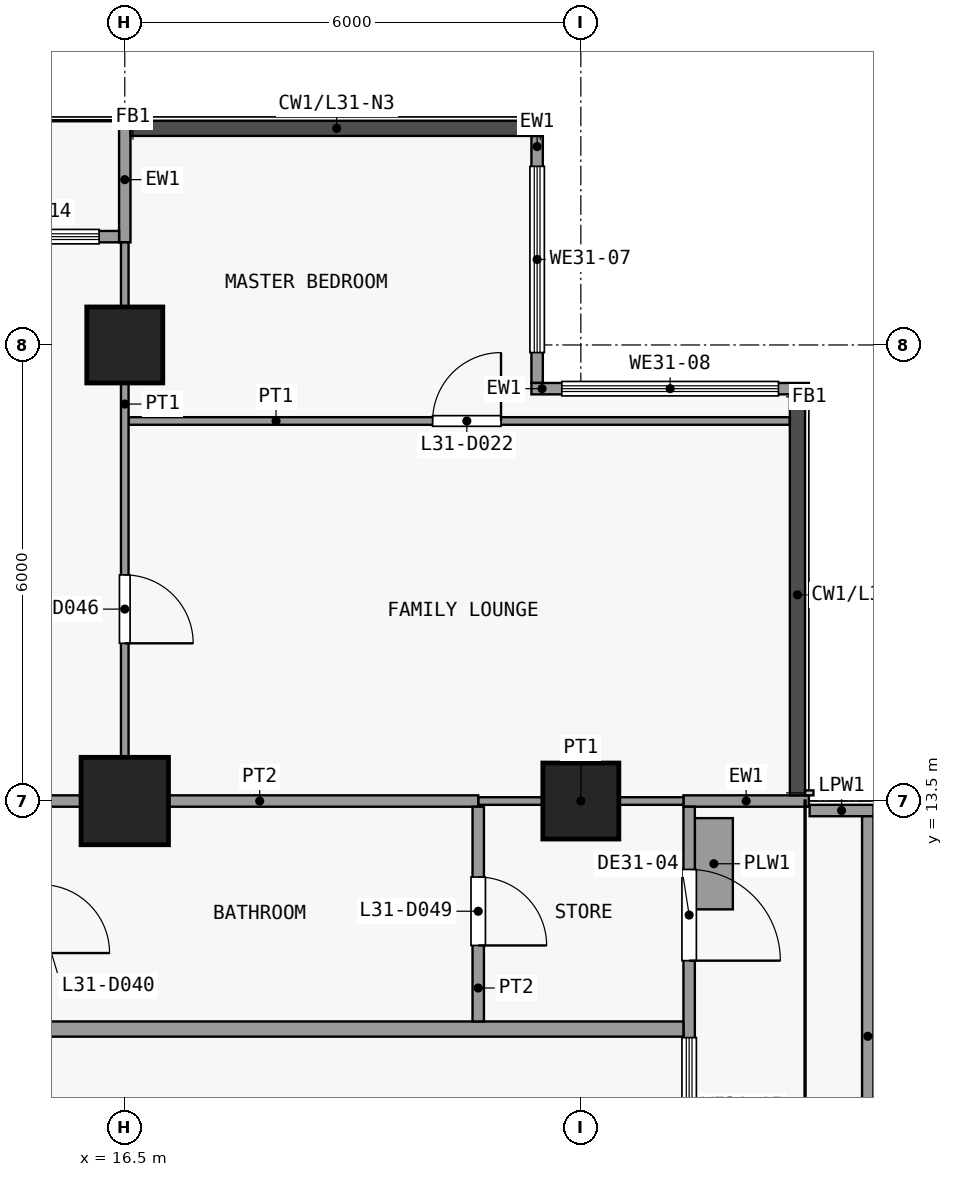
"""IFC4 building model, lengths in metres.
Left out: names, types, materials, properties, quantities, classifications, styles, units other than length and angle.
Written with IfcOpenShell. Run it as: python <this file> out.ifc"""

import sys

from ifc_helpers import new_model, si_unit, direction, frame, frame_2d, origin, origin_2d, place, context, subcontext, project, spatial, rectangle, extrude, element, fill, save


model = new_model("IFC4")
c1 = context("Model", 3, precision=1e-05, world=origin(), true_north=direction((0.0, 1.0)))
c2 = subcontext(c1, "Body", "Model", "MODEL_VIEW")
j1 = project(units=[si_unit("LENGTHUNIT", "METRE"), si_unit("PLANEANGLEUNIT", "RADIAN")], contexts=[c1])
p1 = place(None, origin())
s1 = spatial("IfcSite", under=j1, at=p1, CompositionType="ELEMENT")
p2 = place(p1, origin())
s2 = spatial("IfcBuilding", under=s1, at=p2, CompositionType="ELEMENT")
p3 = place(p2, frame((0.0, 0.0, 124.3)))
s3 = spatial("IfcBuildingStorey", under=s2, at=p3, CompositionType="ELEMENT", Elevation=124.3)
p4 = place(p3, frame((16.5, 13.5, 0.0), z_axis=(0.0, 0.0, 1.0), x_axis=(1.0, 0.0, 0.0)))
e1 = element("IfcColumn", 1, at=p4, inside=s3, PredefinedType="COLUMN", context=c2, shape_type="SweptSolid", body=[
    extrude(rectangle(XDim=1.15, YDim=1.15, at=origin_2d()), origin(), (0.0, 0.0, 1.0), 3.6),
])
for number, where, z_axis, x_axis in (
    (2, (16.5, 19.5, 0.0), (0.0, 0.0, 1.0), (1.0, 0.0, 0.0)),
    (3, (22.5, 13.5, 0.0), (0.0, 0.0, 1.0), (1.0, 0.0, 0.0)),
):
    element("IfcColumn", number, at=place(p3, frame(where, z_axis=z_axis, x_axis=x_axis)), inside=s3, PredefinedType="COLUMN", context=c2, shape_type="SweptSolid", body=[
        extrude(rectangle(XDim=1.0, YDim=1.0, at=origin_2d()), origin(), (0.0, 0.0, 1.0), 3.6),
    ])
p5 = place(p3, frame((21.925, 22.25, 0.0), z_axis=(0.0, 0.0, 1.0), x_axis=(0.0, -1.0, 0.0)))
e4 = element("IfcWall", 4, at=p5, inside=s3, PredefinedType="SOLIDWALL", context=c2, shape_type="SweptSolid", body=[
    extrude(rectangle(XDim=3.25, YDim=0.15, at=frame_2d((1.625, 0.0))), origin(), (0.0, 0.0, 1.0), 3.3),
])
p6 = place(p5, frame((0.4, 0.0, 0.9)))
e5 = element("IfcOpeningElement", 5, at=p6, cuts=e4, PredefinedType="OPENING", context=c2, shape_type="SweptSolid", body=[
    extrude(rectangle(XDim=2.45, YDim=2.4, at=frame_2d((1.225, 1.2))), frame((0.0, 0.085, 0.0), z_axis=(0.0, -1.0, 0.0), x_axis=(1.0, 0.0, 0.0)), (0.0, 0.0, 1.0), 0.17),
])
p7 = place(p3, frame((21.85, 18.925, 0.0), z_axis=(0.0, 0.0, 1.0), x_axis=(1.0, 0.0, 0.0)))
e6 = element("IfcWall", 6, at=p7, inside=s3, PredefinedType="SOLIDWALL", context=c2, shape_type="SweptSolid", body=[
    extrude(rectangle(XDim=3.65, YDim=0.15, at=frame_2d((1.825, 0.0))), origin(), (0.0, 0.0, 1.0), 3.3),
])
p8 = place(p7, frame((0.4, 0.0, 0.9)))
e7 = element("IfcOpeningElement", 7, at=p8, cuts=e6, PredefinedType="OPENING", context=c2, shape_type="SweptSolid", body=[
    extrude(rectangle(XDim=2.85, YDim=2.4, at=frame_2d((1.425, 1.2))), frame((0.0, 0.085, 0.0), z_axis=(0.0, -1.0, 0.0), x_axis=(1.0, 0.0, 0.0)), (0.0, 0.0, 1.0), 0.17),
])
p9 = place(p3, frame((16.5, 20.85, 0.0), z_axis=(0.0, 0.0, 1.0), x_axis=(0.0, 1.0, 0.0)))
e8 = element("IfcWall", 8, at=p9, inside=s3, PredefinedType="SOLIDWALL", context=c2, shape_type="SweptSolid", body=[
    extrude(rectangle(XDim=1.65, YDim=0.15, at=frame_2d((0.825, 0.0))), origin(), (0.0, 0.0, 1.0), 3.3),
])
p10 = place(p3, frame((10.5, 20.925, 0.0), z_axis=(0.0, 0.0, 1.0), x_axis=(1.0, 0.0, 0.0)))
e9 = element("IfcWall", 9, at=p10, inside=s3, PredefinedType="SOLIDWALL", context=c2, shape_type="SweptSolid", body=[
    extrude(rectangle(XDim=5.925, YDim=0.15, at=frame_2d((2.962, 0.0))), origin(), (0.0, 0.0, 1.0), 3.3),
])
p11 = place(p10, frame((2.4, 0.0, 0.0)))
e10 = element("IfcOpeningElement", 10, at=p11, cuts=e9, PredefinedType="OPENING", context=c2, shape_type="SweptSolid", body=[
    extrude(rectangle(XDim=1.2, YDim=2.4, at=frame_2d((0.6, 1.2))), frame((0.0, 0.085, 0.0), z_axis=(0.0, -1.0, 0.0), x_axis=(1.0, 0.0, 0.0)), (0.0, 0.0, 1.0), 0.17),
])
p12 = place(p10, frame((0.3, 0.0, 0.9)))
e11 = element("IfcOpeningElement", 11, at=p12, cuts=e9, PredefinedType="OPENING", context=c2, shape_type="SweptSolid", body=[
    extrude(rectangle(XDim=1.8, YDim=2.1, at=frame_2d((0.9, 1.05))), frame((0.0, 0.085, 0.0), z_axis=(0.0, -1.0, 0.0), x_axis=(1.0, 0.0, 0.0)), (0.0, 0.0, 1.0), 0.17),
])
p13 = place(p10, frame((3.863, 0.0, 0.9)))
e12 = element("IfcOpeningElement", 12, at=p13, cuts=e9, PredefinedType="OPENING", context=c2, shape_type="SweptSolid", body=[
    extrude(rectangle(XDim=1.8, YDim=2.1, at=frame_2d((0.9, 1.05))), frame((0.0, 0.085, 0.0), z_axis=(0.0, -1.0, 0.0), x_axis=(1.0, 0.0, 0.0)), (0.0, 0.0, 1.0), 0.17),
])
p14 = place(p3, frame((23.85, 13.5, 0.0), z_axis=(0.0, 0.0, 1.0), x_axis=(1.0, 0.0, 0.0)))
e13 = element("IfcWall", 13, at=p14, inside=s3, PredefinedType="SOLIDWALL", context=c2, shape_type="SweptSolid", body=[
    extrude(rectangle(XDim=1.65, YDim=0.15, at=frame_2d((0.825, 0.0))), origin(), (0.0, 0.0, 1.0), 3.3),
])
p15 = place(p3, frame((23.925, 13.425, 0.0), z_axis=(0.0, 0.0, 1.0), x_axis=(0.0, -1.0, 0.0)))
e14 = element("IfcWall", 14, at=p15, inside=s3, PredefinedType="SOLIDWALL", context=c2, shape_type="SweptSolid", body=[
    extrude(rectangle(XDim=5.85, YDim=0.15, at=frame_2d((2.925, 0.0))), origin(), (0.0, 0.0, 1.0), 3.3),
])
p16 = place(p15, frame((0.825, 0.0, 0.0)))
e15 = element("IfcOpeningElement", 15, at=p16, cuts=e14, PredefinedType="OPENING", context=c2, shape_type="SweptSolid", body=[
    extrude(rectangle(XDim=1.2, YDim=2.4, at=frame_2d((0.6, 1.2))), frame((0.0, 0.085, 0.0), z_axis=(0.0, -1.0, 0.0), x_axis=(1.0, 0.0, 0.0)), (0.0, 0.0, 1.0), 0.17),
])
p17 = place(p15, frame((3.038, 0.0, 0.9)))
e16 = element("IfcOpeningElement", 16, at=p17, cuts=e14, PredefinedType="OPENING", context=c2, shape_type="SweptSolid", body=[
    extrude(rectangle(XDim=1.8, YDim=2.1, at=frame_2d((0.9, 1.05))), frame((0.0, 0.085, 0.0), z_axis=(0.0, -1.0, 0.0), x_axis=(1.0, 0.0, 0.0)), (0.0, 0.0, 1.0), 0.17),
])
p18 = place(p3, frame((24.25, 12.075, 0.0), z_axis=(0.0, 0.0, 1.0), x_axis=(0.0, 1.0, 0.0)))
e17 = element("IfcWall", 17, at=p18, inside=s3, PredefinedType="USERDEFINED", context=c2, shape_type="SweptSolid", body=[
    extrude(rectangle(XDim=1.2, YDim=0.5, at=frame_2d((0.6, 0.0))), origin(), (0.0, 0.0, 1.0), 0.9),
])
p19 = place(p3, frame((25.51, 13.375, 0.0), z_axis=(0.0, 0.0, 1.0), x_axis=(1.0, 0.0, 0.0)))
e18 = element("IfcWall", 18, at=p19, inside=s3, PredefinedType="PARAPET", context=c2, shape_type="SweptSolid", body=[
    extrude(rectangle(XDim=0.84, YDim=0.15, at=frame_2d((0.42, 0.0))), origin(), (0.0, 0.0, 1.0), 1.15),
])
p20 = place(p3, frame((26.275, 13.3, 0.0), z_axis=(0.0, 0.0, 1.0), x_axis=(0.0, -1.0, 0.0)))
e19 = element("IfcWall", 19, at=p20, inside=s3, PredefinedType="PARAPET", context=c2, shape_type="SweptSolid", body=[
    extrude(rectangle(XDim=5.79, YDim=0.15, at=frame_2d((2.895, 0.0))), origin(), (0.0, 0.0, 1.0), 1.15),
])
p21 = place(p3, frame((-25.35, 10.5, 0.0), z_axis=(0.0, 0.0, 1.0), x_axis=(1.0, 0.0, 0.0)))
e20 = element("IfcWall", 20, at=p21, inside=s3, PredefinedType="PARTITIONING", context=c2, shape_type="SweptSolid", body=[
    extrude(rectangle(XDim=49.2, YDim=0.2, at=frame_2d((24.6, 0.0))), origin(), (0.0, 0.0, 1.0), 3.3),
])
p22 = place(p21, frame((4.55, 0.0, 0.0)))
e21 = element("IfcOpeningElement", 21, at=p22, cuts=e20, PredefinedType="OPENING", context=c2, shape_type="SweptSolid", body=[
    extrude(rectangle(XDim=1.0, YDim=2.1, at=frame_2d((0.5, 1.05))), frame((0.0, 0.11, 0.0), z_axis=(0.0, -1.0, 0.0), x_axis=(1.0, 0.0, 0.0)), (0.0, 0.0, 1.0), 0.22),
])
p23 = place(p21, frame((19.05, 0.0, 0.0)))
e22 = element("IfcOpeningElement", 22, at=p23, cuts=e20, PredefinedType="OPENING", context=c2, shape_type="SweptSolid", body=[
    extrude(rectangle(XDim=1.0, YDim=2.1, at=frame_2d((0.5, 1.05))), frame((0.0, 0.11, 0.0), z_axis=(0.0, -1.0, 0.0), x_axis=(1.0, 0.0, 0.0)), (0.0, 0.0, 1.0), 0.22),
])
p24 = place(p21, frame((39.05, 0.0, 0.0)))
e23 = element("IfcOpeningElement", 23, at=p24, cuts=e20, PredefinedType="OPENING", context=c2, shape_type="SweptSolid", body=[
    extrude(rectangle(XDim=1.0, YDim=2.1, at=frame_2d((0.5, 1.05))), frame((0.0, 0.11, 0.0), z_axis=(0.0, -1.0, 0.0), x_axis=(1.0, 0.0, 0.0)), (0.0, 0.0, 1.0), 0.22),
])
p25 = place(p3, frame((21.15, 13.5, 0.0), z_axis=(0.0, 0.0, 1.0), x_axis=(1.0, 0.0, 0.0)))
e24 = element("IfcWall", 24, at=p25, inside=s3, PredefinedType="PARTITIONING", context=c2, shape_type="SweptSolid", body=[
    extrude(rectangle(XDim=2.7, YDim=0.1, at=frame_2d((1.35, 0.0))), origin(), (0.0, 0.0, 1.0), 3.3),
])
p26 = place(p3, frame((15.4, 13.5, 0.0), z_axis=(0.0, 0.0, 1.0), x_axis=(1.0, 0.0, 0.0)))
e25 = element("IfcWall", 25, at=p26, inside=s3, PredefinedType="PARTITIONING", context=c2, shape_type="SweptSolid", body=[
    extrude(rectangle(XDim=5.75, YDim=0.15, at=frame_2d((2.875, 0.0))), origin(), (0.0, 0.0, 1.0), 3.3),
])
p27 = place(p3, frame((16.55, 18.5, 0.0), z_axis=(0.0, 0.0, 1.0), x_axis=(1.0, 0.0, 0.0)))
e26 = element("IfcWall", 26, at=p27, inside=s3, PredefinedType="PARTITIONING", context=c2, shape_type="SweptSolid", body=[
    extrude(rectangle(XDim=8.7, YDim=0.1, at=frame_2d((4.35, 0.0))), origin(), (0.0, 0.0, 1.0), 3.3),
])
p28 = place(p27, frame((4.0, 0.0, 0.0)))
e27 = element("IfcOpeningElement", 27, at=p28, cuts=e26, PredefinedType="OPENING", context=c2, shape_type="SweptSolid", body=[
    extrude(rectangle(XDim=0.9, YDim=2.1, at=frame_2d((0.45, 1.05))), frame((0.0, 0.06, 0.0), z_axis=(0.0, -1.0, 0.0), x_axis=(1.0, 0.0, 0.0)), (0.0, 0.0, 1.0), 0.12),
])
p29 = place(p3, frame((16.5, 13.575, 0.0), z_axis=(0.0, 0.0, 1.0), x_axis=(0.0, 1.0, 0.0)))
e28 = element("IfcWall", 28, at=p29, inside=s3, PredefinedType="PARTITIONING", context=c2, shape_type="SweptSolid", body=[
    extrude(rectangle(XDim=7.275, YDim=0.1, at=frame_2d((3.638, 0.0))), origin(), (0.0, 0.0, 1.0), 3.3),
])
p30 = place(p29, frame((2.0, 0.0, 0.0)))
e29 = element("IfcOpeningElement", 29, at=p30, cuts=e28, PredefinedType="OPENING", context=c2, shape_type="SweptSolid", body=[
    extrude(rectangle(XDim=0.9, YDim=2.1, at=frame_2d((0.45, 1.05))), frame((0.0, 0.06, 0.0), z_axis=(0.0, -1.0, 0.0), x_axis=(1.0, 0.0, 0.0)), (0.0, 0.0, 1.0), 0.12),
])
p31 = place(p3, frame((21.15, 10.6, 0.0), z_axis=(0.0, 0.0, 1.0), x_axis=(0.0, 1.0, 0.0)))
e30 = element("IfcWall", 30, at=p31, inside=s3, PredefinedType="PARTITIONING", context=c2, shape_type="SweptSolid", body=[
    extrude(rectangle(XDim=2.825, YDim=0.15, at=frame_2d((1.413, 0.0))), origin(), (0.0, 0.0, 1.0), 3.3),
])
p32 = place(p31, frame((1.0, 0.0, 0.0)))
e31 = element("IfcOpeningElement", 31, at=p32, cuts=e30, PredefinedType="OPENING", context=c2, shape_type="SweptSolid", body=[
    extrude(rectangle(XDim=0.9, YDim=2.1, at=frame_2d((0.45, 1.05))), frame((0.0, 0.085, 0.0), z_axis=(0.0, -1.0, 0.0), x_axis=(1.0, 0.0, 0.0)), (0.0, 0.0, 1.0), 0.17),
])
p33 = place(p6, origin())
e32 = element("IfcWindow", 32, at=p33, inside=s3, PartitioningType="SINGLE_PANEL", PredefinedType="WINDOW", context=c2, shape_type="SweptSolid", body=[
    extrude(rectangle(XDim=2.45, YDim=2.4, at=frame_2d((1.225, 1.2))), frame((0.0, 0.03, 0.0), z_axis=(0.0, -1.0, 0.0), x_axis=(1.0, 0.0, 0.0)), (0.0, 0.0, 1.0), 0.06),
])
fill(e5, e32)
p34 = place(p8, origin())
e33 = element("IfcWindow", 33, at=p34, inside=s3, PartitioningType="SINGLE_PANEL", PredefinedType="WINDOW", context=c2, shape_type="SweptSolid", body=[
    extrude(rectangle(XDim=2.85, YDim=2.4, at=frame_2d((1.425, 1.2))), frame((0.0, 0.03, 0.0), z_axis=(0.0, -1.0, 0.0), x_axis=(1.0, 0.0, 0.0)), (0.0, 0.0, 1.0), 0.06),
])
fill(e7, e33)
p35 = place(p13, origin())
e34 = element("IfcWindow", 34, at=p35, inside=s3, PartitioningType="SINGLE_PANEL", PredefinedType="WINDOW", context=c2, shape_type="SweptSolid", body=[
    extrude(rectangle(XDim=1.8, YDim=2.1, at=frame_2d((0.9, 1.05))), frame((0.0, 0.03, 0.0), z_axis=(0.0, -1.0, 0.0), x_axis=(1.0, 0.0, 0.0)), (0.0, 0.0, 1.0), 0.06),
])
fill(e12, e34)
p36 = place(p16, origin())
e35 = element("IfcDoor", 35, at=p36, inside=s3, OperationType="SINGLE_SWING_RIGHT", PredefinedType="DOOR", context=c2, shape_type="SweptSolid", body=[
    extrude(rectangle(XDim=1.2, YDim=2.4, at=frame_2d((0.6, 1.2))), frame((0.0, 0.025, 0.0), z_axis=(0.0, -1.0, 0.0), x_axis=(1.0, 0.0, 0.0)), (0.0, 0.0, 1.0), 0.05),
])
fill(e15, e35)
p37 = place(p17, origin())
e36 = element("IfcWindow", 36, at=p37, inside=s3, PartitioningType="SINGLE_PANEL", PredefinedType="WINDOW", context=c2, shape_type="SweptSolid", body=[
    extrude(rectangle(XDim=1.8, YDim=2.1, at=frame_2d((0.9, 1.05))), frame((0.0, 0.03, 0.0), z_axis=(0.0, -1.0, 0.0), x_axis=(1.0, 0.0, 0.0)), (0.0, 0.0, 1.0), 0.06),
])
fill(e16, e36)
p38 = place(p28, origin())
e37 = element("IfcDoor", 37, at=p38, inside=s3, OperationType="SINGLE_SWING_LEFT", PredefinedType="DOOR", context=c2, shape_type="SweptSolid", body=[
    extrude(rectangle(XDim=0.9, YDim=2.1, at=frame_2d((0.45, 1.05))), frame((0.0, 0.025, 0.0), z_axis=(0.0, -1.0, 0.0), x_axis=(1.0, 0.0, 0.0)), (0.0, 0.0, 1.0), 0.05),
])
fill(e27, e37)
p39 = place(p30, origin())
e38 = element("IfcDoor", 38, at=p39, inside=s3, OperationType="SINGLE_SWING_LEFT", PredefinedType="DOOR", context=c2, shape_type="SweptSolid", body=[
    extrude(rectangle(XDim=0.9, YDim=2.1, at=frame_2d((0.45, 1.05))), frame((0.0, 0.025, 0.0), z_axis=(0.0, -1.0, 0.0), x_axis=(1.0, 0.0, 0.0)), (0.0, 0.0, 1.0), 0.05),
])
fill(e29, e38)
p40 = place(p32, origin())
e39 = element("IfcDoor", 39, at=p40, inside=s3, OperationType="SINGLE_SWING_LEFT", PredefinedType="DOOR", context=c2, shape_type="SweptSolid", body=[
    extrude(rectangle(XDim=0.9, YDim=2.1, at=frame_2d((0.45, 1.05))), frame((0.0, 0.025, 0.0), z_axis=(0.0, -1.0, 0.0), x_axis=(1.0, 0.0, 0.0)), (0.0, 0.0, 1.0), 0.05),
])
fill(e31, e39)
save(model, sys.argv[1])
